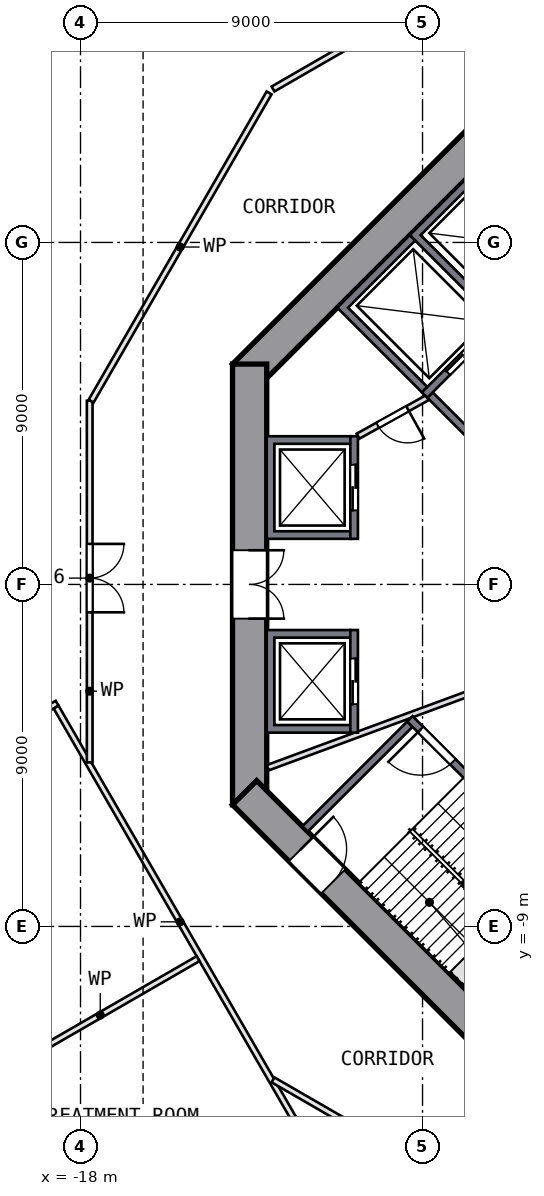
"""IFC4 building model, lengths in metres.
Left out: names, types, materials, properties, quantities, classifications, styles, units other than length and angle.
Written with IfcOpenShell. Run it as: python <this file> out.ifc"""

import sys

from ifc_helpers import new_model, si_unit, direction, frame, frame_2d, origin, place, context, subcontext, project, spatial, polyline, rectangle, outline, extrude, element, fill, save


model = new_model("IFC4")
c1 = context("Model", 3, precision=1e-05, world=origin(), true_north=direction((0.0, 1.0)))
c2 = subcontext(c1, "Body", "Model", "MODEL_VIEW")
j1 = project(units=[si_unit("LENGTHUNIT", "METRE"), si_unit("PLANEANGLEUNIT", "RADIAN")], contexts=[c1])
p1 = place(None, origin())
s1 = spatial("IfcSite", under=j1, at=p1, CompositionType="ELEMENT")
p2 = place(p1, origin())
s2 = spatial("IfcBuilding", under=s1, at=p2, CompositionType="ELEMENT")
p3 = place(p2, frame((0.0, 0.0, 23.5)))
s3 = spatial("IfcBuildingStorey", under=s2, at=p3, CompositionType="ELEMENT", Elevation=23.5)
p4 = place(p3, frame((-5.481, 13.682, 0.0), z_axis=(0.0, 0.0, 1.0), x_axis=(-0.707106781, -0.707106781, 0.0)))
e1 = element("IfcWall", 1, at=p4, inside=s3, PredefinedType="SHEAR", context=c2, shape_type="SweptSolid", body=[
    extrude(rectangle(XDim=11.598, YDim=0.9, at=frame_2d((5.799, 0.0))), origin(), (0.0, 0.0, 1.0), 4.5),
])
p5 = place(p3, frame((-13.55, 5.799, 0.0), z_axis=(0.0, 0.0, 1.0), x_axis=(0.0, -1.0, 0.0)))
e2 = element("IfcWall", 2, at=p5, inside=s3, PredefinedType="SHEAR", context=c2, shape_type="SweptSolid", body=[
    extrude(rectangle(XDim=11.598, YDim=0.9, at=frame_2d((5.799, 0.0))), origin(), (0.0, 0.0, 1.0), 4.5),
])
p6 = place(p5, frame((4.899, 0.0, 0.0)))
e3 = element("IfcOpeningElement", 3, at=p6, cuts=e2, PredefinedType="OPENING", context=c2, shape_type="SweptSolid", body=[
    extrude(rectangle(XDim=1.8, YDim=2.1, at=frame_2d((0.9, 1.05))), frame((0.0, 0.46, 0.0), z_axis=(0.0, -1.0, 0.0), x_axis=(1.0, 0.0, 0.0)), (0.0, 0.0, 1.0), 0.92),
])
p7 = place(p3, frame((-13.682, -5.481, 0.0), z_axis=(0.0, 0.0, 1.0), x_axis=(0.707106781, -0.707106781, 0.0)))
e4 = element("IfcWall", 4, at=p7, inside=s3, PredefinedType="SHEAR", context=c2, shape_type="SweptSolid", body=[
    extrude(rectangle(XDim=11.598, YDim=0.9, at=frame_2d((5.799, 0.0))), origin(), (0.0, 0.0, 1.0), 4.5),
])
p8 = place(p7, frame((2.099, 0.0, 0.0)))
e5 = element("IfcOpeningElement", 5, at=p8, cuts=e4, PredefinedType="OPENING", context=c2, shape_type="SweptSolid", body=[
    extrude(rectangle(XDim=1.2, YDim=2.1, at=frame_2d((0.6, 1.05))), frame((0.0, 0.46, 0.0), z_axis=(0.0, -1.0, 0.0), x_axis=(1.0, 0.0, 0.0)), (0.0, 0.0, 1.0), 0.92),
])
p9 = place(p3, frame((-17.777, 17.586, 0.0), z_axis=(0.0, 0.0, 1.0), x_axis=(-0.500006139, -0.866021859, 0.0)))
e6 = element("IfcWall", 6, at=p9, inside=s3, PredefinedType="SOLIDWALL", context=c2, shape_type="SweptSolid", body=[
    extrude(rectangle(XDim=12.962, YDim=0.14, at=frame_2d((6.481, 0.0))), origin(), (0.0, 0.0, 1.0), 4.0),
])
p10 = place(p9, frame((1.748, 0.0, 0.9)))
e7 = element("IfcOpeningElement", 7, at=p10, cuts=e6, PredefinedType="OPENING", context=c2, shape_type="SweptSolid", body=[
    extrude(rectangle(XDim=3.0, YDim=2.4, at=frame_2d((1.5, 1.2))), frame((0.0, 0.08, 0.0), z_axis=(0.0, -1.0, 0.0), x_axis=(1.0, 0.0, 0.0)), (0.0, 0.0, 1.0), 0.16),
])
p11 = place(p9, frame((7.935, 0.0, 0.9)))
e8 = element("IfcOpeningElement", 8, at=p11, cuts=e6, PredefinedType="OPENING", context=c2, shape_type="SweptSolid", body=[
    extrude(rectangle(XDim=3.0, YDim=2.4, at=frame_2d((1.5, 1.2))), frame((0.0, 0.08, 0.0), z_axis=(0.0, -1.0, 0.0), x_axis=(1.0, 0.0, 0.0)), (0.0, 0.0, 1.0), 0.16),
])
p12 = place(p3, origin())
e9 = element("IfcWall", 9, at=p12, inside=s3, PredefinedType="SOLIDWALL", context=c2, shape_type="SweptSolid", body=[
    extrude(outline(polyline([(-13.1, 3.9), (-10.9, 3.9), (-10.9, 3.7), (-12.9, 3.7), (-12.9, 1.4), (-10.9, 1.4), (-10.9, 1.2), (-13.1, 1.2), (-13.1, 3.9)])), origin(), (0.0, 0.0, 1.0), 4.0),
])
p13 = place(p3, frame((-10.8, 1.2, 0.0), z_axis=(0.0, 0.0, 1.0), x_axis=(0.0, 1.0, 0.0)))
e10 = element("IfcWall", 10, at=p13, inside=s3, PredefinedType="SOLIDWALL", context=c2, shape_type="SweptSolid", body=[
    extrude(rectangle(XDim=2.7, YDim=0.2, at=frame_2d((1.35, 0.0))), origin(), (0.0, 0.0, 1.0), 4.0),
])
p14 = place(p13, frame((0.75, 0.0, 0.0)))
e11 = element("IfcOpeningElement", 11, at=p14, cuts=e10, PredefinedType="OPENING", context=c2, shape_type="SweptSolid", body=[
    extrude(rectangle(XDim=1.2, YDim=2.1, at=frame_2d((0.6, 1.05))), frame((0.0, 0.11, 0.0), z_axis=(0.0, -1.0, 0.0), x_axis=(1.0, 0.0, 0.0)), (0.0, 0.0, 1.0), 0.22),
])
p15 = place(p3, origin())
e12 = element("IfcWall", 12, at=p15, inside=s3, PredefinedType="SOLIDWALL", context=c2, shape_type="SweptSolid", body=[
    extrude(outline(polyline([(-13.1, -3.9), (-13.1, -1.2), (-10.9, -1.2), (-10.9, -1.4), (-12.9, -1.4), (-12.9, -3.7), (-10.9, -3.7), (-10.9, -3.9), (-13.1, -3.9)])), origin(), (0.0, 0.0, 1.0), 4.0),
])
p16 = place(p3, frame((-10.8, -1.2, 0.0), z_axis=(0.0, 0.0, 1.0), x_axis=(0.0, -1.0, 0.0)))
e13 = element("IfcWall", 13, at=p16, inside=s3, PredefinedType="SOLIDWALL", context=c2, shape_type="SweptSolid", body=[
    extrude(rectangle(XDim=2.7, YDim=0.2, at=frame_2d((1.35, 0.0))), origin(), (0.0, 0.0, 1.0), 4.0),
])
p17 = place(p16, frame((0.75, 0.0, 0.0)))
e14 = element("IfcOpeningElement", 14, at=p17, cuts=e13, PredefinedType="OPENING", context=c2, shape_type="SweptSolid", body=[
    extrude(rectangle(XDim=1.2, YDim=2.1, at=frame_2d((0.6, 1.05))), frame((0.0, 0.11, 0.0), z_axis=(0.0, -1.0, 0.0), x_axis=(1.0, 0.0, 0.0)), (0.0, 0.0, 1.0), 0.22),
])
p18 = place(p3, origin())
e15 = element("IfcWall", 15, at=p18, inside=s3, PredefinedType="SOLIDWALL", context=c2, shape_type="SweptSolid", body=[
    extrude(outline(polyline([(-9.334, 9.192), (-7.283, 11.243), (-5.056, 9.016), (-5.197, 8.874), (-7.283, 10.96), (-9.051, 9.192), (-6.965, 7.106), (-7.106, 6.965), (-9.334, 9.192)])), origin(), (0.0, 0.0, 1.0), 4.0),
])
p19 = place(p3, origin())
e16 = element("IfcWall", 16, at=p19, inside=s3, PredefinedType="SOLIDWALL", context=c2, shape_type="SweptSolid", body=[
    extrude(outline(polyline([(-11.243, 7.283), (-9.334, 9.192), (-9.192, 9.051), (-10.96, 7.283), (-8.874, 5.197), (-9.016, 5.056), (-11.243, 7.283)])), origin(), (0.0, 0.0, 1.0), 4.0),
])
p20 = place(p3, frame((-7.036, 6.894, 0.0), z_axis=(0.0, 0.0, 1.0), x_axis=(-0.707106781, -0.707106781, 0.0)))
e17 = element("IfcWall", 17, at=p20, inside=s3, PredefinedType="SOLIDWALL", context=c2, shape_type="SweptSolid", body=[
    extrude(rectangle(XDim=2.7, YDim=0.2, at=frame_2d((1.35, 0.0))), origin(), (0.0, 0.0, 1.0), 4.0),
])
p21 = place(p20, frame((0.65, 0.0, 0.0)))
e18 = element("IfcOpeningElement", 18, at=p21, cuts=e17, PredefinedType="OPENING", context=c2, shape_type="SweptSolid", body=[
    extrude(rectangle(XDim=1.2, YDim=2.1, at=frame_2d((0.6, 1.05))), frame((0.0, 0.11, 0.0), z_axis=(0.0, -1.0, 0.0), x_axis=(1.0, 0.0, 0.0)), (0.0, 0.0, 1.0), 0.22),
])
p22 = place(p3, frame((-3.535, -9.334, 0.0), z_axis=(0.0, 0.0, 1.0), x_axis=(-0.707106781, 0.707106781, 0.0)))
e19 = element("IfcWall", 19, at=p22, inside=s3, PredefinedType="SOLIDWALL", context=c2, shape_type="SweptSolid", body=[
    extrude(rectangle(XDim=8.2, YDim=0.2, at=frame_2d((4.1, 0.0))), origin(), (0.0, 0.0, 1.0), 4.0),
])
p23 = place(p22, frame((6.6, 0.0, 0.0)))
e20 = element("IfcOpeningElement", 20, at=p23, cuts=e19, PredefinedType="OPENING", context=c2, shape_type="SweptSolid", body=[
    extrude(rectangle(XDim=1.2, YDim=2.1, at=frame_2d((0.6, 1.05))), frame((0.0, 0.11, 0.0), z_axis=(0.0, -1.0, 0.0), x_axis=(1.0, 0.0, 0.0)), (0.0, 0.0, 1.0), 0.22),
])
p24 = place(p3, frame((-9.334, -3.677, 0.0), z_axis=(0.0, 0.0, 1.0), x_axis=(-0.707106781, -0.707106781, 0.0)))
e21 = element("IfcWall", 21, at=p24, inside=s3, PredefinedType="SOLIDWALL", context=c2, shape_type="SweptSolid", body=[
    extrude(rectangle(XDim=3.9, YDim=0.2, at=frame_2d((1.95, 0.0))), origin(), (0.0, 0.0, 1.0), 4.0),
])
p25 = place(p3, frame((-6.823, 3.005, 0.0), z_axis=(0.0, 0.0, 1.0), x_axis=(-0.707106781, 0.707106781, 0.0)))
e22 = element("IfcWall", 22, at=p25, inside=s3, PredefinedType="SOLIDWALL", context=c2, shape_type="SweptSolid", body=[
    extrude(rectangle(XDim=2.8, YDim=0.2, at=frame_2d((1.4, 0.0))), origin(), (0.0, 0.0, 1.0), 4.0),
])
p26 = place(p3, frame((-8.874, 4.914, 0.0), z_axis=(0.0, 0.0, 1.0), x_axis=(-0.874129705, -0.485692555, 0.0)))
e23 = element("IfcWall", 23, at=p26, inside=s3, PredefinedType="PARTITIONING", context=c2, shape_type="SweptSolid", body=[
    extrude(rectangle(XDim=2.089, YDim=0.15, at=frame_2d((1.044, 0.0))), origin(), (0.0, 0.0, 1.0), 4.0),
])
p27 = place(p26, frame((0.594, 0.0, 0.0)))
e24 = element("IfcOpeningElement", 24, at=p27, cuts=e23, PredefinedType="OPENING", context=c2, shape_type="SweptSolid", body=[
    extrude(rectangle(XDim=0.9, YDim=2.1, at=frame_2d((0.45, 1.05))), frame((0.0, 0.085, 0.0), z_axis=(0.0, -1.0, 0.0), x_axis=(1.0, 0.0, 0.0)), (0.0, 0.0, 1.0), 0.17),
])
p28 = place(p3, frame((-4.813, -1.776, 0.0), z_axis=(0.0, 0.0, 1.0), x_axis=(-0.93819293, -0.346112737, 0.0)))
e25 = element("IfcWall", 25, at=p28, inside=s3, PredefinedType="PARTITIONING", context=c2, shape_type="SweptSolid", body=[
    extrude(rectangle(XDim=8.803, YDim=0.15, at=frame_2d((4.402, 0.0))), origin(), (0.0, 0.0, 1.0), 4.0),
])
p29 = place(p28, frame((1.4, 0.0, 0.0)))
e26 = element("IfcOpeningElement", 26, at=p29, cuts=e25, PredefinedType="OPENING", context=c2, shape_type="SweptSolid", body=[
    extrude(rectangle(XDim=1.8, YDim=2.1, at=frame_2d((0.9, 1.05))), frame((0.0, 0.085, 0.0), z_axis=(0.0, -1.0, 0.0), x_axis=(1.0, 0.0, 0.0)), (0.0, 0.0, 1.0), 0.17),
])
p30 = place(p3, frame((-18.614, -3.126, 0.0), z_axis=(0.0, 0.0, 1.0), x_axis=(-0.866030255, -0.499991598, 0.0)))
e27 = element("IfcWall", 27, at=p30, inside=s3, PredefinedType="PARTITIONING", context=c2, shape_type="SweptSolid", body=[
    extrude(rectangle(XDim=5.732, YDim=0.15, at=frame_2d((2.866, 0.0))), origin(), (0.0, 0.0, 1.0), 4.0),
])
p31 = place(p3, frame((-18.642, -3.228, 0.0), z_axis=(0.0, 0.0, 1.0), x_axis=(0.499998298, -0.866026387, 0.0)))
e28 = element("IfcWall", 28, at=p31, inside=s3, PredefinedType="PARTITIONING", context=c2, shape_type="SweptSolid", body=[
    extrude(rectangle(XDim=13.05, YDim=0.15, at=frame_2d((6.525, 0.0))), origin(), (0.0, 0.0, 1.0), 4.0),
])
p32 = place(p3, frame((-17.758, 4.833, 0.0), z_axis=(0.0, 0.0, 1.0), x_axis=(0.0, -1.0, 0.0)))
e29 = element("IfcWall", 29, at=p32, inside=s3, PredefinedType="PARTITIONING", context=c2, shape_type="SweptSolid", body=[
    extrude(rectangle(XDim=9.517, YDim=0.15, at=frame_2d((4.758, 0.0))), origin(), (0.0, 0.0, 1.0), 4.0),
])
p33 = place(p32, frame((3.767, 0.0, 0.0)))
e30 = element("IfcOpeningElement", 30, at=p33, cuts=e29, PredefinedType="OPENING", context=c2, shape_type="SweptSolid", body=[
    extrude(rectangle(XDim=1.8, YDim=2.1, at=frame_2d((0.9, 1.05))), frame((0.0, 0.085, 0.0), z_axis=(0.0, -1.0, 0.0), x_axis=(1.0, 0.0, 0.0)), (0.0, 0.0, 1.0), 0.17),
])
p34 = place(p3, frame((-17.721, 4.823, 0.0), z_axis=(0.0, 0.0, 1.0), x_axis=(0.499979668, 0.866037142, 0.0)))
e31 = element("IfcWall", 31, at=p34, inside=s3, PredefinedType="PARTITIONING", context=c2, shape_type="SweptSolid", body=[
    extrude(rectangle(XDim=9.367, YDim=0.15, at=frame_2d((4.683, 0.0))), origin(), (0.0, 0.0, 1.0), 4.0),
])
p35 = place(p3, frame((-14.906, -9.848, 0.0), z_axis=(0.0, 0.0, 1.0), x_axis=(-0.866038559, -0.499977214, 0.0)))
e32 = element("IfcWall", 32, at=p35, inside=s3, PredefinedType="PARTITIONING", context=c2, shape_type="SweptSolid", body=[
    extrude(rectangle(XDim=5.945, YDim=0.15, at=frame_2d((2.973, 0.0))), origin(), (0.0, 0.0, 1.0), 4.0),
])
p36 = place(p3, frame((-4.823, 17.721, 0.0), z_axis=(0.0, 0.0, 1.0), x_axis=(-0.866037142, -0.499979668, 0.0)))
e33 = element("IfcWall", 33, at=p36, inside=s3, PredefinedType="PARTITIONING", context=c2, shape_type="SweptSolid", body=[
    extrude(rectangle(XDim=9.367, YDim=0.15, at=frame_2d((4.683, 0.0))), origin(), (0.0, 0.0, 1.0), 4.0),
])
p37 = place(p36, frame((3.817, 0.0, 0.0)))
e34 = element("IfcOpeningElement", 34, at=p37, cuts=e33, PredefinedType="OPENING", context=c2, shape_type="SweptSolid", body=[
    extrude(rectangle(XDim=1.8, YDim=2.1, at=frame_2d((0.9, 1.05))), frame((0.0, 0.085, 0.0), z_axis=(0.0, -1.0, 0.0), x_axis=(1.0, 0.0, 0.0)), (0.0, 0.0, 1.0), 0.17),
])
p38 = place(p3, frame((-12.935, -13.038, 0.0), z_axis=(0.0, 0.0, 1.0), x_axis=(0.866027519, -0.499996337, 0.0)))
e35 = element("IfcWall", 35, at=p38, inside=s3, PredefinedType="PARTITIONING", context=c2, shape_type="SweptSolid", body=[
    extrude(rectangle(XDim=9.517, YDim=0.15, at=frame_2d((4.758, 0.0))), origin(), (0.0, 0.0, 1.0), 4.0),
])
p39 = place(p38, frame((3.767, 0.0, 0.0)))
e36 = element("IfcOpeningElement", 36, at=p39, cuts=e35, PredefinedType="OPENING", context=c2, shape_type="SweptSolid", body=[
    extrude(rectangle(XDim=1.8, YDim=2.1, at=frame_2d((0.9, 1.05))), frame((0.0, 0.085, 0.0), z_axis=(0.0, -1.0, 0.0), x_axis=(1.0, 0.0, 0.0)), (0.0, 0.0, 1.0), 0.17),
])
p40 = place(p10, origin())
e37 = element("IfcWindow", 37, at=p40, inside=s3, PartitioningType="SINGLE_PANEL", PredefinedType="WINDOW", context=c2, shape_type="SweptSolid", body=[
    extrude(rectangle(XDim=3.0, YDim=2.4, at=frame_2d((1.5, 1.2))), frame((0.0, 0.03, 0.0), z_axis=(0.0, -1.0, 0.0), x_axis=(1.0, 0.0, 0.0)), (0.0, 0.0, 1.0), 0.06),
])
fill(e7, e37)
p41 = place(p14, origin())
e38 = element("IfcDoor", 38, at=p41, inside=s3, OperationType="DOUBLE_DOOR_SLIDING", PredefinedType="DOOR", context=c2, shape_type="SweptSolid", body=[
    extrude(rectangle(XDim=1.2, YDim=2.1, at=frame_2d((0.6, 1.05))), frame((0.0, 0.025, 0.0), z_axis=(0.0, -1.0, 0.0), x_axis=(1.0, 0.0, 0.0)), (0.0, 0.0, 1.0), 0.05),
])
fill(e11, e38)
p42 = place(p17, origin())
e39 = element("IfcDoor", 39, at=p42, inside=s3, OperationType="DOUBLE_DOOR_SLIDING", PredefinedType="DOOR", context=c2, shape_type="SweptSolid", body=[
    extrude(rectangle(XDim=1.2, YDim=2.1, at=frame_2d((0.6, 1.05))), frame((0.0, 0.025, 0.0), z_axis=(0.0, -1.0, 0.0), x_axis=(1.0, 0.0, 0.0)), (0.0, 0.0, 1.0), 0.05),
])
fill(e14, e39)
p43 = place(p21, origin())
e40 = element("IfcDoor", 40, at=p43, inside=s3, OperationType="DOUBLE_DOOR_SLIDING", PredefinedType="DOOR", context=c2, shape_type="SweptSolid", body=[
    extrude(rectangle(XDim=1.2, YDim=2.1, at=frame_2d((0.6, 1.05))), frame((0.0, 0.025, 0.0), z_axis=(0.0, -1.0, 0.0), x_axis=(1.0, 0.0, 0.0)), (0.0, 0.0, 1.0), 0.05),
])
fill(e18, e40)
p44 = place(p23, origin())
e41 = element("IfcDoor", 41, at=p44, inside=s3, OperationType="SINGLE_SWING_RIGHT", PredefinedType="DOOR", context=c2, shape_type="SweptSolid", body=[
    extrude(rectangle(XDim=1.2, YDim=2.1, at=frame_2d((0.6, 1.05))), frame((0.0, 0.025, 0.0), z_axis=(0.0, -1.0, 0.0), x_axis=(1.0, 0.0, 0.0)), (0.0, 0.0, 1.0), 0.05),
])
fill(e20, e41)
p45 = place(p6, origin())
e42 = element("IfcDoor", 42, at=p45, inside=s3, OperationType="DOUBLE_DOOR_SINGLE_SWING", PredefinedType="DOOR", context=c2, shape_type="SweptSolid", body=[
    extrude(rectangle(XDim=1.8, YDim=2.1, at=frame_2d((0.9, 1.05))), frame((0.0, 0.025, 0.0), z_axis=(0.0, -1.0, 0.0), x_axis=(1.0, 0.0, 0.0)), (0.0, 0.0, 1.0), 0.05),
])
fill(e3, e42)
p46 = place(p8, origin())
e43 = element("IfcDoor", 43, at=p46, inside=s3, OperationType="SINGLE_SWING_LEFT", PredefinedType="DOOR", context=c2, shape_type="SweptSolid", body=[
    extrude(rectangle(XDim=1.2, YDim=2.1, at=frame_2d((0.6, 1.05))), frame((0.0, 0.025, 0.0), z_axis=(0.0, -1.0, 0.0), x_axis=(1.0, 0.0, 0.0)), (0.0, 0.0, 1.0), 0.05),
])
fill(e5, e43)
p47 = place(p27, origin())
e44 = element("IfcDoor", 44, at=p47, inside=s3, OperationType="SINGLE_SWING_LEFT", PredefinedType="DOOR", context=c2, shape_type="SweptSolid", body=[
    extrude(rectangle(XDim=0.9, YDim=2.1, at=frame_2d((0.45, 1.05))), frame((0.0, 0.025, 0.0), z_axis=(0.0, -1.0, 0.0), x_axis=(1.0, 0.0, 0.0)), (0.0, 0.0, 1.0), 0.05),
])
fill(e24, e44)
p48 = place(p33, origin())
e45 = element("IfcDoor", 45, at=p48, inside=s3, OperationType="DOUBLE_DOOR_SINGLE_SWING", PredefinedType="DOOR", context=c2, shape_type="SweptSolid", body=[
    extrude(rectangle(XDim=1.8, YDim=2.1, at=frame_2d((0.9, 1.05))), frame((0.0, 0.025, 0.0), z_axis=(0.0, -1.0, 0.0), x_axis=(1.0, 0.0, 0.0)), (0.0, 0.0, 1.0), 0.05),
])
fill(e30, e45)
save(model, sys.argv[1])
